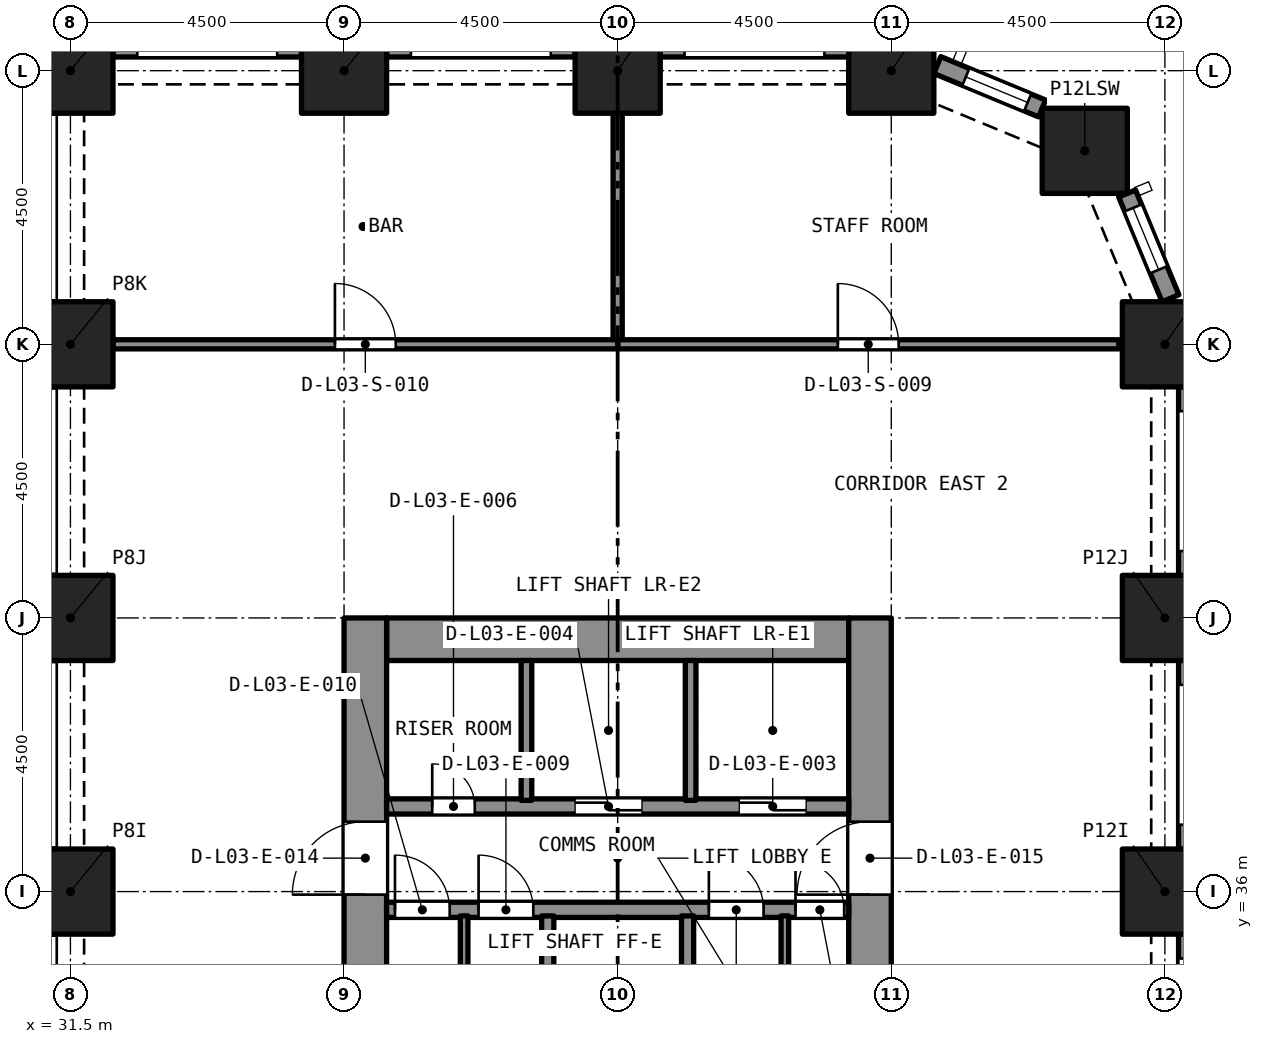
"""IFC4 building model, lengths in metres.
Left out: names, types, materials, properties, quantities, classifications, styles, units other than length and angle.
Written with IfcOpenShell. Run it as: python <this file> out.ifc"""

import sys

from ifc_helpers import new_model, si_unit, direction, frame, frame_2d, origin, origin_2d, place, context, subcontext, project, spatial, rectangle, extrude, element, fill, save


model = new_model("IFC4")
c1 = context("Model", 3, precision=1e-05, world=origin(), true_north=direction((0.0, 1.0)))
c2 = subcontext(c1, "Body", "Model", "MODEL_VIEW")
j1 = project(units=[si_unit("LENGTHUNIT", "METRE"), si_unit("PLANEANGLEUNIT", "RADIAN")], contexts=[c1])
p1 = place(None, origin())
s1 = spatial("IfcSite", under=j1, at=p1, CompositionType="ELEMENT")
p2 = place(p1, origin())
s2 = spatial("IfcBuilding", under=s1, at=p2, CompositionType="ELEMENT")
p3 = place(p2, frame((0.0, 0.0, 16.0)))
s3 = spatial("IfcBuildingStorey", under=s2, at=p3, CompositionType="ELEMENT", Elevation=16.0)
for number, where, z_axis, x_axis in (
    (1, (31.5, 36.0, 0.0), (0.0, 0.0, 1.0), (1.0, 0.0, 0.0)),
    (2, (49.5, 36.0, 0.0), (0.0, 0.0, 1.0), (1.0, 0.0, 0.0)),
    (3, (31.5, 40.5, 0.0), (0.0, 0.0, 1.0), (1.0, 0.0, 0.0)),
    (4, (49.5, 40.5, 0.0), (0.0, 0.0, 1.0), (1.0, 0.0, 0.0)),
    (5, (31.5, 45.0, 0.0), (0.0, 0.0, 1.0), (1.0, 0.0, 0.0)),
    (6, (49.5, 45.0, 0.0), (0.0, 0.0, 1.0), (1.0, 0.0, 0.0)),
    (7, (48.182, 48.182, 0.0), (0.0, 0.0, 1.0), (1.0, 0.0, 0.0)),
    (8, (31.5, 49.5, 0.0), (0.0, 0.0, 1.0), (1.0, 0.0, 0.0)),
    (9, (36.0, 49.5, 0.0), (0.0, 0.0, 1.0), (1.0, 0.0, 0.0)),
    (10, (40.5, 49.5, 0.0), (0.0, 0.0, 1.0), (1.0, 0.0, 0.0)),
    (11, (45.0, 49.5, 0.0), (0.0, 0.0, 1.0), (1.0, 0.0, 0.0)),
):
    element("IfcColumn", number, at=place(p3, frame(where, z_axis=z_axis, x_axis=x_axis)), inside=s3, PredefinedType="COLUMN", context=c2, shape_type="SweptSolid", body=[
        extrude(rectangle(XDim=1.4, YDim=1.4, at=origin_2d()), origin(), (0.0, 0.0, 1.0), 5.0),
    ])
p4 = place(p3, frame((36.7, 40.15, 0.0), z_axis=(0.0, 0.0, 1.0), x_axis=(1.0, 0.0, 0.0)))
e12 = element("IfcWall", 12, at=p4, inside=s3, PredefinedType="SOLIDWALL", context=c2, shape_type="SweptSolid", body=[
    extrude(rectangle(XDim=7.6, YDim=0.7, at=frame_2d((3.8, 0.0))), origin(), (0.0, 0.0, 1.0), 5.0),
])
p5 = place(p3, frame((36.35, 27.0, 0.0), z_axis=(0.0, 0.0, 1.0), x_axis=(0.0, 1.0, 0.0)))
e13 = element("IfcWall", 13, at=p5, inside=s3, PredefinedType="SOLIDWALL", context=c2, shape_type="SweptSolid", body=[
    extrude(rectangle(XDim=13.5, YDim=0.7, at=frame_2d((6.75, 0.0))), origin(), (0.0, 0.0, 1.0), 5.0),
])
p6 = place(p5, frame((8.95, 0.0, 0.0)))
e14 = element("IfcOpeningElement", 14, at=p6, cuts=e13, PredefinedType="OPENING", context=c2, shape_type="SweptSolid", body=[
    extrude(rectangle(XDim=1.2, YDim=2.1, at=frame_2d((0.6, 1.05))), frame((0.0, 0.36, 0.0), z_axis=(0.0, -1.0, 0.0), x_axis=(1.0, 0.0, 0.0)), (0.0, 0.0, 1.0), 0.72),
])
p7 = place(p3, frame((44.65, 27.0, 0.0), z_axis=(0.0, 0.0, 1.0), x_axis=(0.0, 1.0, 0.0)))
e15 = element("IfcWall", 15, at=p7, inside=s3, PredefinedType="SOLIDWALL", context=c2, shape_type="SweptSolid", body=[
    extrude(rectangle(XDim=13.5, YDim=0.7, at=frame_2d((6.75, 0.0))), origin(), (0.0, 0.0, 1.0), 5.0),
])
p8 = place(p7, frame((8.95, 0.0, 0.0)))
e16 = element("IfcOpeningElement", 16, at=p8, cuts=e15, PredefinedType="OPENING", context=c2, shape_type="SweptSolid", body=[
    extrude(rectangle(XDim=1.2, YDim=2.1, at=frame_2d((0.6, 1.05))), frame((0.0, 0.36, 0.0), z_axis=(0.0, -1.0, 0.0), x_axis=(1.0, 0.0, 0.0)), (0.0, 0.0, 1.0), 0.72),
])
p9 = place(p3, frame((49.875, 35.3, 0.0), z_axis=(0.0, 0.0, 1.0), x_axis=(0.0, -1.0, 0.0)))
e17 = element("IfcWall", 17, at=p9, inside=s3, PredefinedType="SOLIDWALL", context=c2, shape_type="SweptSolid", body=[
    extrude(rectangle(XDim=3.1, YDim=0.3, at=frame_2d((1.55, 0.0))), origin(), (0.0, 0.0, 1.0), 5.0),
])
p10 = place(p9, frame((0.4, 0.0, 0.45)))
e18 = element("IfcOpeningElement", 18, at=p10, cuts=e17, PredefinedType="OPENING", context=c2, shape_type="SweptSolid", body=[
    extrude(rectangle(XDim=2.3, YDim=3.3, at=frame_2d((1.15, 1.65))), frame((0.0, 0.16, 0.0), z_axis=(0.0, -1.0, 0.0), x_axis=(1.0, 0.0, 0.0)), (0.0, 0.0, 1.0), 0.32),
])
p11 = place(p3, frame((49.875, 39.8, 0.0), z_axis=(0.0, 0.0, 1.0), x_axis=(0.0, -1.0, 0.0)))
e19 = element("IfcWall", 19, at=p11, inside=s3, PredefinedType="SOLIDWALL", context=c2, shape_type="SweptSolid", body=[
    extrude(rectangle(XDim=3.1, YDim=0.3, at=frame_2d((1.55, 0.0))), origin(), (0.0, 0.0, 1.0), 5.0),
])
p12 = place(p11, frame((0.4, 0.0, 0.45)))
e20 = element("IfcOpeningElement", 20, at=p12, cuts=e19, PredefinedType="OPENING", context=c2, shape_type="SweptSolid", body=[
    extrude(rectangle(XDim=2.3, YDim=3.3, at=frame_2d((1.15, 1.65))), frame((0.0, 0.16, 0.0), z_axis=(0.0, -1.0, 0.0), x_axis=(1.0, 0.0, 0.0)), (0.0, 0.0, 1.0), 0.32),
])
p13 = place(p3, frame((49.875, 44.3, 0.0), z_axis=(0.0, 0.0, 1.0), x_axis=(0.0, -1.0, 0.0)))
e21 = element("IfcWall", 21, at=p13, inside=s3, PredefinedType="SOLIDWALL", context=c2, shape_type="SweptSolid", body=[
    extrude(rectangle(XDim=3.1, YDim=0.3, at=frame_2d((1.55, 0.0))), origin(), (0.0, 0.0, 1.0), 5.0),
])
p14 = place(p13, frame((0.4, 0.0, 0.45)))
e22 = element("IfcOpeningElement", 22, at=p14, cuts=e21, PredefinedType="OPENING", context=c2, shape_type="SweptSolid", body=[
    extrude(rectangle(XDim=2.3, YDim=3.3, at=frame_2d((1.15, 1.65))), frame((0.0, 0.16, 0.0), z_axis=(0.0, -1.0, 0.0), x_axis=(1.0, 0.0, 0.0)), (0.0, 0.0, 1.0), 0.32),
])
p15 = place(p3, frame((48.878, 47.48, 0.0), z_axis=(0.0, 0.0, 1.0), x_axis=(0.38262540684, -0.923903565336, 0.0)))
e23 = element("IfcWall", 23, at=p15, inside=s3, PredefinedType="SOLIDWALL", context=c2, shape_type="SweptSolid", body=[
    extrude(rectangle(XDim=1.865, YDim=0.3, at=frame_2d((0.933, 0.0))), origin(), (0.0, 0.0, 1.0), 5.0),
])
p16 = place(p15, frame((0.258, 0.0, 0.45)))
e24 = element("IfcOpeningElement", 24, at=p16, cuts=e23, PredefinedType="OPENING", context=c2, shape_type="SweptSolid", body=[
    extrude(rectangle(XDim=1.1, YDim=3.3, at=frame_2d((0.55, 1.65))), frame((0.0, 0.16, 0.0), z_axis=(0.0, -1.0, 0.0), x_axis=(1.0, 0.0, 0.0)), (0.0, 0.0, 1.0), 0.32),
])
p17 = place(p3, frame((45.757, 49.592, 0.0), z_axis=(0.0, 0.0, 1.0), x_axis=(0.923857286003, -0.382737135771, 0.0)))
e25 = element("IfcWall", 25, at=p17, inside=s3, PredefinedType="SOLIDWALL", context=c2, shape_type="SweptSolid", body=[
    extrude(rectangle(XDim=1.865, YDim=0.3, at=frame_2d((0.933, 0.0))), origin(), (0.0, 0.0, 1.0), 5.0),
])
p18 = place(p17, frame((0.508, 0.0, 0.45)))
e26 = element("IfcOpeningElement", 26, at=p18, cuts=e25, PredefinedType="OPENING", context=c2, shape_type="SweptSolid", body=[
    extrude(rectangle(XDim=1.1, YDim=3.3, at=frame_2d((0.55, 1.65))), frame((0.0, 0.16, 0.0), z_axis=(0.0, -1.0, 0.0), x_axis=(1.0, 0.0, 0.0)), (0.0, 0.0, 1.0), 0.32),
])
p19 = place(p3, frame((41.2, 49.875, 0.0), z_axis=(0.0, 0.0, 1.0), x_axis=(1.0, 0.0, 0.0)))
e27 = element("IfcWall", 27, at=p19, inside=s3, PredefinedType="SOLIDWALL", context=c2, shape_type="SweptSolid", body=[
    extrude(rectangle(XDim=3.1, YDim=0.3, at=frame_2d((1.55, 0.0))), origin(), (0.0, 0.0, 1.0), 5.0),
])
p20 = place(p19, frame((0.4, 0.0, 0.45)))
e28 = element("IfcOpeningElement", 28, at=p20, cuts=e27, PredefinedType="OPENING", context=c2, shape_type="SweptSolid", body=[
    extrude(rectangle(XDim=2.3, YDim=3.3, at=frame_2d((1.15, 1.65))), frame((0.0, 0.16, 0.0), z_axis=(0.0, -1.0, 0.0), x_axis=(1.0, 0.0, 0.0)), (0.0, 0.0, 1.0), 0.32),
])
p21 = place(p3, frame((36.7, 49.875, 0.0), z_axis=(0.0, 0.0, 1.0), x_axis=(1.0, 0.0, 0.0)))
e29 = element("IfcWall", 29, at=p21, inside=s3, PredefinedType="SOLIDWALL", context=c2, shape_type="SweptSolid", body=[
    extrude(rectangle(XDim=3.1, YDim=0.3, at=frame_2d((1.55, 0.0))), origin(), (0.0, 0.0, 1.0), 5.0),
])
p22 = place(p21, frame((0.4, 0.0, 0.45)))
e30 = element("IfcOpeningElement", 30, at=p22, cuts=e29, PredefinedType="OPENING", context=c2, shape_type="SweptSolid", body=[
    extrude(rectangle(XDim=2.3, YDim=3.3, at=frame_2d((1.15, 1.65))), frame((0.0, 0.16, 0.0), z_axis=(0.0, -1.0, 0.0), x_axis=(1.0, 0.0, 0.0)), (0.0, 0.0, 1.0), 0.32),
])
p23 = place(p3, frame((32.2, 49.875, 0.0), z_axis=(0.0, 0.0, 1.0), x_axis=(1.0, 0.0, 0.0)))
e31 = element("IfcWall", 31, at=p23, inside=s3, PredefinedType="SOLIDWALL", context=c2, shape_type="SweptSolid", body=[
    extrude(rectangle(XDim=3.1, YDim=0.3, at=frame_2d((1.55, 0.0))), origin(), (0.0, 0.0, 1.0), 5.0),
])
p24 = place(p23, frame((0.4, 0.0, 0.45)))
e32 = element("IfcOpeningElement", 32, at=p24, cuts=e31, PredefinedType="OPENING", context=c2, shape_type="SweptSolid", body=[
    extrude(rectangle(XDim=2.3, YDim=3.3, at=frame_2d((1.15, 1.65))), frame((0.0, 0.16, 0.0), z_axis=(0.0, -1.0, 0.0), x_axis=(1.0, 0.0, 0.0)), (0.0, 0.0, 1.0), 0.32),
])
p25 = place(p3, frame((36.7, 35.7, 0.0), z_axis=(0.0, 0.0, 1.0), x_axis=(1.0, 0.0, 0.0)))
e33 = element("IfcWall", 33, at=p25, inside=s3, PredefinedType="SOLIDWALL", context=c2, shape_type="SweptSolid", body=[
    extrude(rectangle(XDim=7.6, YDim=0.25, at=frame_2d((3.8, 0.0))), origin(), (0.0, 0.0, 1.0), 4.65),
])
p26 = place(p25, frame((6.725, 0.0, 0.0)))
e34 = element("IfcOpeningElement", 34, at=p26, cuts=e33, PredefinedType="OPENING", context=c2, shape_type="SweptSolid", body=[
    extrude(rectangle(XDim=0.8, YDim=2.1, at=frame_2d((0.4, 1.05))), frame((0.0, 0.135, 0.0), z_axis=(0.0, -1.0, 0.0), x_axis=(1.0, 0.0, 0.0)), (0.0, 0.0, 1.0), 0.27),
])
p27 = place(p25, frame((5.3, 0.0, 0.0)))
e35 = element("IfcOpeningElement", 35, at=p27, cuts=e33, PredefinedType="OPENING", context=c2, shape_type="SweptSolid", body=[
    extrude(rectangle(XDim=0.9, YDim=2.1, at=frame_2d((0.45, 1.05))), frame((0.0, 0.135, 0.0), z_axis=(0.0, -1.0, 0.0), x_axis=(1.0, 0.0, 0.0)), (0.0, 0.0, 1.0), 0.27),
])
p28 = place(p25, frame((1.512, 0.0, 0.0)))
e36 = element("IfcOpeningElement", 36, at=p28, cuts=e33, PredefinedType="OPENING", context=c2, shape_type="SweptSolid", body=[
    extrude(rectangle(XDim=0.9, YDim=2.1, at=frame_2d((0.45, 1.05))), frame((0.0, 0.135, 0.0), z_axis=(0.0, -1.0, 0.0), x_axis=(1.0, 0.0, 0.0)), (0.0, 0.0, 1.0), 0.27),
])
p29 = place(p25, frame((0.137, 0.0, 0.0)))
e37 = element("IfcOpeningElement", 37, at=p29, cuts=e33, PredefinedType="OPENING", context=c2, shape_type="SweptSolid", body=[
    extrude(rectangle(XDim=0.9, YDim=2.1, at=frame_2d((0.45, 1.05))), frame((0.0, 0.135, 0.0), z_axis=(0.0, -1.0, 0.0), x_axis=(1.0, 0.0, 0.0)), (0.0, 0.0, 1.0), 0.27),
])
p30 = place(p3, frame((36.7, 37.4, 0.0), z_axis=(0.0, 0.0, 1.0), x_axis=(1.0, 0.0, 0.0)))
e38 = element("IfcWall", 38, at=p30, inside=s3, PredefinedType="SOLIDWALL", context=c2, shape_type="SweptSolid", body=[
    extrude(rectangle(XDim=7.6, YDim=0.25, at=frame_2d((3.8, 0.0))), origin(), (0.0, 0.0, 1.0), 4.65),
])
p31 = place(p30, frame((5.8, 0.0, 0.0)))
e39 = element("IfcOpeningElement", 39, at=p31, cuts=e38, PredefinedType="OPENING", context=c2, shape_type="SweptSolid", body=[
    extrude(rectangle(XDim=1.1, YDim=2.4, at=frame_2d((0.55, 1.2))), frame((0.0, 0.135, 0.0), z_axis=(0.0, -1.0, 0.0), x_axis=(1.0, 0.0, 0.0)), (0.0, 0.0, 1.0), 0.27),
])
p32 = place(p30, frame((3.1, 0.0, 0.0)))
e40 = element("IfcOpeningElement", 40, at=p32, cuts=e38, PredefinedType="OPENING", context=c2, shape_type="SweptSolid", body=[
    extrude(rectangle(XDim=1.1, YDim=2.4, at=frame_2d((0.55, 1.2))), frame((0.0, 0.135, 0.0), z_axis=(0.0, -1.0, 0.0), x_axis=(1.0, 0.0, 0.0)), (0.0, 0.0, 1.0), 0.27),
])
p33 = place(p30, frame((0.75, 0.0, 0.0)))
e41 = element("IfcOpeningElement", 41, at=p33, cuts=e38, PredefinedType="OPENING", context=c2, shape_type="SweptSolid", body=[
    extrude(rectangle(XDim=0.7, YDim=2.1, at=frame_2d((0.35, 1.05))), frame((0.0, 0.135, 0.0), z_axis=(0.0, -1.0, 0.0), x_axis=(1.0, 0.0, 0.0)), (0.0, 0.0, 1.0), 0.27),
])
for number, where, z_axis, x_axis in (
    (42, (41.65, 33.3, 0.0), (0.0, 0.0, 1.0), (0.0, 1.0, 0.0)),
    (43, (39.35, 33.3, 0.0), (0.0, 0.0, 1.0), (0.0, 1.0, 0.0)),
):
    element("IfcWall", number, at=place(p3, frame(where, z_axis=z_axis, x_axis=x_axis)), inside=s3, PredefinedType="SOLIDWALL", context=c2, shape_type="SweptSolid", body=[
        extrude(rectangle(XDim=2.3, YDim=0.2, at=frame_2d((1.15, 0.0))), origin(), (0.0, 0.0, 1.0), 4.65),
    ])
for number, where, z_axis, x_axis in (
    (44, (41.7, 37.5, 0.0), (0.0, 0.0, 1.0), (0.0, 1.0, 0.0)),
    (45, (39.0, 37.5, 0.0), (0.0, 0.0, 1.0), (0.0, 1.0, 0.0)),
):
    element("IfcWall", number, at=place(p3, frame(where, z_axis=z_axis, x_axis=x_axis)), inside=s3, PredefinedType="SOLIDWALL", context=c2, shape_type="SweptSolid", body=[
        extrude(rectangle(XDim=2.3, YDim=0.175, at=frame_2d((1.15, 0.0))), origin(), (0.0, 0.0, 1.0), 4.65),
    ])
for number, where, z_axis, x_axis in (
    (46, (43.25, 33.3, 0.0), (0.0, 0.0, 1.0), (0.0, 1.0, 0.0)),
    (47, (37.975, 33.3, 0.0), (0.0, 0.0, 1.0), (0.0, 1.0, 0.0)),
):
    element("IfcWall", number, at=place(p3, frame(where, z_axis=z_axis, x_axis=x_axis)), inside=s3, PredefinedType="PARTITIONING", context=c2, shape_type="SweptSolid", body=[
        extrude(rectangle(XDim=2.3, YDim=0.125, at=frame_2d((1.15, 0.0))), origin(), (0.0, 0.0, 1.0), 4.65),
    ])
p34 = place(p3, frame((40.5, 45.075, 0.0), z_axis=(0.0, 0.0, 1.0), x_axis=(0.0, 1.0, 0.0)))
e48 = element("IfcWall", 48, at=p34, inside=s3, PredefinedType="PARTITIONING", context=c2, shape_type="SweptSolid", body=[
    extrude(rectangle(XDim=3.725, YDim=0.15, at=frame_2d((1.863, 0.0))), origin(), (0.0, 0.0, 1.0), 4.65),
])
p35 = place(p3, frame((40.5, 45.0, 0.0), z_axis=(0.0, 0.0, 1.0), x_axis=(1.0, 0.0, 0.0)))
e49 = element("IfcWall", 49, at=p35, inside=s3, PredefinedType="PARTITIONING", context=c2, shape_type="SweptSolid", body=[
    extrude(rectangle(XDim=8.242, YDim=0.15, at=frame_2d((4.121, 0.0))), origin(), (0.0, 0.0, 1.0), 4.65),
])
p36 = place(p35, frame((3.621, 0.0, 0.0)))
e50 = element("IfcOpeningElement", 50, at=p36, cuts=e49, PredefinedType="OPENING", context=c2, shape_type="SweptSolid", body=[
    extrude(rectangle(XDim=1.0, YDim=2.1, at=frame_2d((0.5, 1.05))), frame((0.0, 0.085, 0.0), z_axis=(0.0, -1.0, 0.0), x_axis=(1.0, 0.0, 0.0)), (0.0, 0.0, 1.0), 0.17),
])
p37 = place(p3, frame((32.2, 45.0, 0.0), z_axis=(0.0, 0.0, 1.0), x_axis=(1.0, 0.0, 0.0)))
e51 = element("IfcWall", 51, at=p37, inside=s3, PredefinedType="PARTITIONING", context=c2, shape_type="SweptSolid", body=[
    extrude(rectangle(XDim=8.3, YDim=0.15, at=frame_2d((4.15, 0.0))), origin(), (0.0, 0.0, 1.0), 4.65),
])
p38 = place(p37, frame((3.65, 0.0, 0.0)))
e52 = element("IfcOpeningElement", 52, at=p38, cuts=e51, PredefinedType="OPENING", context=c2, shape_type="SweptSolid", body=[
    extrude(rectangle(XDim=1.0, YDim=2.1, at=frame_2d((0.5, 1.05))), frame((0.0, 0.085, 0.0), z_axis=(0.0, -1.0, 0.0), x_axis=(1.0, 0.0, 0.0)), (0.0, 0.0, 1.0), 0.17),
])
p39 = place(p16, origin())
e53 = element("IfcWindow", 53, at=p39, inside=s3, PartitioningType="SINGLE_PANEL", PredefinedType="WINDOW", context=c2, shape_type="SweptSolid", body=[
    extrude(rectangle(XDim=1.1, YDim=3.3, at=frame_2d((0.55, 1.65))), frame((0.0, 0.03, 0.0), z_axis=(0.0, -1.0, 0.0), x_axis=(1.0, 0.0, 0.0)), (0.0, 0.0, 1.0), 0.06),
])
fill(e24, e53)
p40 = place(p18, origin())
e54 = element("IfcWindow", 54, at=p40, inside=s3, PartitioningType="SINGLE_PANEL", PredefinedType="WINDOW", context=c2, shape_type="SweptSolid", body=[
    extrude(rectangle(XDim=1.1, YDim=3.3, at=frame_2d((0.55, 1.65))), frame((0.0, 0.03, 0.0), z_axis=(0.0, -1.0, 0.0), x_axis=(1.0, 0.0, 0.0)), (0.0, 0.0, 1.0), 0.06),
])
fill(e26, e54)
p41 = place(p31, origin())
e55 = element("IfcDoor", 55, at=p41, inside=s3, OperationType="SLIDING_TO_LEFT", PredefinedType="DOOR", context=c2, shape_type="SweptSolid", body=[
    extrude(rectangle(XDim=1.1, YDim=2.4, at=frame_2d((0.55, 1.2))), frame((0.0, 0.025, 0.0), z_axis=(0.0, -1.0, 0.0), x_axis=(1.0, 0.0, 0.0)), (0.0, 0.0, 1.0), 0.05),
])
fill(e39, e55)
p42 = place(p32, origin())
e56 = element("IfcDoor", 56, at=p42, inside=s3, OperationType="SLIDING_TO_LEFT", PredefinedType="DOOR", context=c2, shape_type="SweptSolid", body=[
    extrude(rectangle(XDim=1.1, YDim=2.4, at=frame_2d((0.55, 1.2))), frame((0.0, 0.025, 0.0), z_axis=(0.0, -1.0, 0.0), x_axis=(1.0, 0.0, 0.0)), (0.0, 0.0, 1.0), 0.05),
])
fill(e40, e56)
p43 = place(p33, origin())
e57 = element("IfcDoor", 57, at=p43, inside=s3, OperationType="SINGLE_SWING_LEFT", PredefinedType="DOOR", context=c2, shape_type="SweptSolid", body=[
    extrude(rectangle(XDim=0.7, YDim=2.1, at=frame_2d((0.35, 1.05))), frame((0.0, 0.025, 0.0), z_axis=(0.0, -1.0, 0.0), x_axis=(1.0, 0.0, 0.0)), (0.0, 0.0, 1.0), 0.05),
])
fill(e41, e57)
p44 = place(p26, origin())
e58 = element("IfcDoor", 58, at=p44, inside=s3, OperationType="SINGLE_SWING_LEFT", PredefinedType="DOOR", context=c2, shape_type="SweptSolid", body=[
    extrude(rectangle(XDim=0.8, YDim=2.1, at=frame_2d((0.4, 1.05))), frame((0.0, 0.025, 0.0), z_axis=(0.0, -1.0, 0.0), x_axis=(1.0, 0.0, 0.0)), (0.0, 0.0, 1.0), 0.05),
])
fill(e34, e58)
p45 = place(p27, origin())
e59 = element("IfcDoor", 59, at=p45, inside=s3, OperationType="SINGLE_SWING_LEFT", PredefinedType="DOOR", context=c2, shape_type="SweptSolid", body=[
    extrude(rectangle(XDim=0.9, YDim=2.1, at=frame_2d((0.45, 1.05))), frame((0.0, 0.025, 0.0), z_axis=(0.0, -1.0, 0.0), x_axis=(1.0, 0.0, 0.0)), (0.0, 0.0, 1.0), 0.05),
])
fill(e35, e59)
p46 = place(p28, origin())
e60 = element("IfcDoor", 60, at=p46, inside=s3, OperationType="SINGLE_SWING_LEFT", PredefinedType="DOOR", context=c2, shape_type="SweptSolid", body=[
    extrude(rectangle(XDim=0.9, YDim=2.1, at=frame_2d((0.45, 1.05))), frame((0.0, 0.025, 0.0), z_axis=(0.0, -1.0, 0.0), x_axis=(1.0, 0.0, 0.0)), (0.0, 0.0, 1.0), 0.05),
])
fill(e36, e60)
p47 = place(p29, origin())
e61 = element("IfcDoor", 61, at=p47, inside=s3, OperationType="SINGLE_SWING_LEFT", PredefinedType="DOOR", context=c2, shape_type="SweptSolid", body=[
    extrude(rectangle(XDim=0.9, YDim=2.1, at=frame_2d((0.45, 1.05))), frame((0.0, 0.025, 0.0), z_axis=(0.0, -1.0, 0.0), x_axis=(1.0, 0.0, 0.0)), (0.0, 0.0, 1.0), 0.05),
])
fill(e37, e61)
p48 = place(p6, origin())
e62 = element("IfcDoor", 62, at=p48, inside=s3, OperationType="SINGLE_SWING_LEFT", PredefinedType="DOOR", context=c2, shape_type="SweptSolid", body=[
    extrude(rectangle(XDim=1.2, YDim=2.1, at=frame_2d((0.6, 1.05))), frame((0.0, 0.025, 0.0), z_axis=(0.0, -1.0, 0.0), x_axis=(1.0, 0.0, 0.0)), (0.0, 0.0, 1.0), 0.05),
])
fill(e14, e62)
p49 = place(p8, origin())
e63 = element("IfcDoor", 63, at=p49, inside=s3, OperationType="SINGLE_SWING_LEFT", PredefinedType="DOOR", context=c2, shape_type="SweptSolid", body=[
    extrude(rectangle(XDim=1.2, YDim=2.1, at=frame_2d((0.6, 1.05))), frame((0.0, 0.025, 0.0), z_axis=(0.0, -1.0, 0.0), x_axis=(1.0, 0.0, 0.0)), (0.0, 0.0, 1.0), 0.05),
])
fill(e16, e63)
p50 = place(p36, origin())
e64 = element("IfcDoor", 64, at=p50, inside=s3, OperationType="SINGLE_SWING_RIGHT", PredefinedType="DOOR", context=c2, shape_type="SweptSolid", body=[
    extrude(rectangle(XDim=1.0, YDim=2.1, at=frame_2d((0.5, 1.05))), frame((0.0, 0.025, 0.0), z_axis=(0.0, -1.0, 0.0), x_axis=(1.0, 0.0, 0.0)), (0.0, 0.0, 1.0), 0.05),
])
fill(e50, e64)
p51 = place(p38, origin())
e65 = element("IfcDoor", 65, at=p51, inside=s3, OperationType="SINGLE_SWING_RIGHT", PredefinedType="DOOR", context=c2, shape_type="SweptSolid", body=[
    extrude(rectangle(XDim=1.0, YDim=2.1, at=frame_2d((0.5, 1.05))), frame((0.0, 0.025, 0.0), z_axis=(0.0, -1.0, 0.0), x_axis=(1.0, 0.0, 0.0)), (0.0, 0.0, 1.0), 0.05),
])
fill(e52, e65)
save(model, sys.argv[1])
